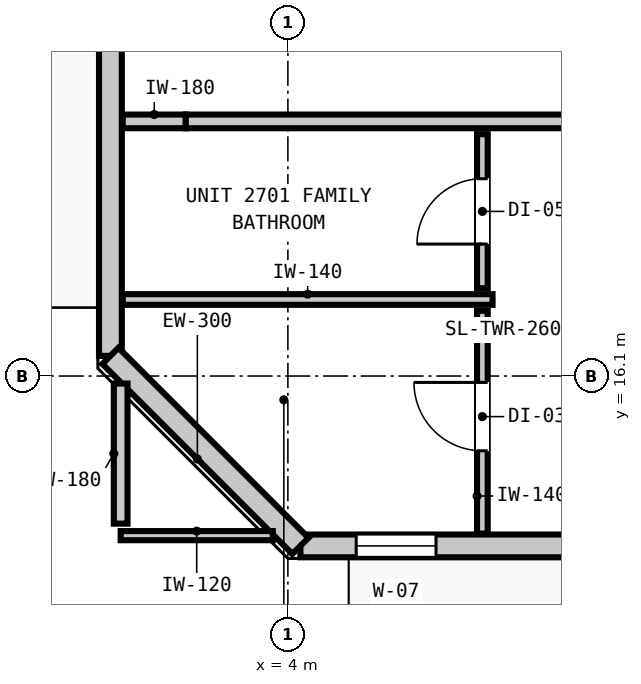
"""IFC4 building model, lengths in metres.
Left out: names, types, materials, properties, quantities, classifications, styles, units other than length and angle.
Written with IfcOpenShell. Run it as: python <this file> out.ifc"""

import sys

from ifc_helpers import new_model, si_unit, direction, frame, frame_2d, origin, place, context, subcontext, project, spatial, rectangle, extrude, element, fill, save


model = new_model("IFC4")
c1 = context("Model", 3, precision=1e-05, world=origin(), true_north=direction((0.0, 1.0)))
c2 = subcontext(c1, "Body", "Model", "MODEL_VIEW")
j1 = project(units=[si_unit("LENGTHUNIT", "METRE"), si_unit("PLANEANGLEUNIT", "RADIAN")], contexts=[c1])
p1 = place(None, origin())
s1 = spatial("IfcSite", under=j1, at=p1, CompositionType="ELEMENT")
p2 = place(p1, origin())
s2 = spatial("IfcBuilding", under=s1, at=p2, CompositionType="ELEMENT")
p3 = place(p2, frame((0.0, 0.0, 96.12)))
s3 = spatial("IfcBuildingStorey", under=s2, at=p3, CompositionType="ELEMENT", Elevation=96.12)
p4 = place(p3, frame((1.665, 16.365, 0.0), z_axis=(0.0, 0.0, 1.0), x_axis=(0.0, 1.0, 0.0)))
e1 = element("IfcWall", 1, at=p4, inside=s3, PredefinedType="STANDARD", context=c2, shape_type="SweptSolid", body=[
    extrude(rectangle(XDim=34.67, YDim=0.3, at=frame_2d((17.335, 0.0))), origin(), (0.0, 0.0, 1.0), 3.06),
])
p5 = place(p4, frame((6.854, 0.0, 0.0)))
e2 = element("IfcOpeningElement", 2, at=p5, cuts=e1, PredefinedType="OPENING", context=c2, shape_type="SweptSolid", body=[
    extrude(rectangle(XDim=1.0, YDim=2.15, at=frame_2d((0.5, 1.075))), frame((0.0, 0.16, 0.0), z_axis=(0.0, -1.0, 0.0), x_axis=(1.0, 0.0, 0.0)), (0.0, 0.0, 1.0), 0.32),
])
p6 = place(p4, frame((32.839, 0.0, 0.85)))
e3 = element("IfcOpeningElement", 3, at=p6, cuts=e1, PredefinedType="OPENING", context=c2, shape_type="SweptSolid", body=[
    extrude(rectangle(XDim=1.05, YDim=1.65, at=frame_2d((0.525, 0.825))), frame((0.0, 0.16, 0.0), z_axis=(0.0, -1.0, 0.0), x_axis=(1.0, 0.0, 0.0)), (0.0, 0.0, 1.0), 0.32),
])
p7 = place(p4, frame((10.044, 0.0, 0.85)))
e4 = element("IfcOpeningElement", 4, at=p7, cuts=e1, PredefinedType="OPENING", context=c2, shape_type="SweptSolid", body=[
    extrude(rectangle(XDim=2.4, YDim=1.95, at=frame_2d((1.2, 0.975))), frame((0.0, 0.16, 0.0), z_axis=(0.0, -1.0, 0.0), x_axis=(1.0, 0.0, 0.0)), (0.0, 0.0, 1.0), 0.32),
])
p8 = place(p4, frame((19.145, 0.0, 0.85)))
e5 = element("IfcOpeningElement", 5, at=p8, cuts=e1, PredefinedType="OPENING", context=c2, shape_type="SweptSolid", body=[
    extrude(rectangle(XDim=2.4, YDim=1.95, at=frame_2d((1.2, 0.975))), frame((0.0, 0.16, 0.0), z_axis=(0.0, -1.0, 0.0), x_axis=(1.0, 0.0, 0.0)), (0.0, 0.0, 1.0), 0.32),
])
p9 = place(p3, frame((41.635, 13.865, 0.0), z_axis=(0.0, 0.0, 1.0), x_axis=(-1.0, 0.0, 0.0)))
e6 = element("IfcWall", 6, at=p9, inside=s3, PredefinedType="STANDARD", context=c2, shape_type="SweptSolid", body=[
    extrude(rectangle(XDim=37.47, YDim=0.3, at=frame_2d((18.735, 0.0))), origin(), (0.0, 0.0, 1.0), 3.06),
])
p10 = place(p9, frame((0.901, 0.0, 0.0)))
e7 = element("IfcOpeningElement", 7, at=p10, cuts=e6, PredefinedType="OPENING", context=c2, shape_type="SweptSolid", body=[
    extrude(rectangle(XDim=1.0, YDim=2.15, at=frame_2d((0.5, 1.075))), frame((0.0, 0.16, 0.0), z_axis=(0.0, -1.0, 0.0), x_axis=(1.0, 0.0, 0.0)), (0.0, 0.0, 1.0), 0.32),
])
p11 = place(p9, frame((31.179, 0.0, 0.85)))
e8 = element("IfcOpeningElement", 8, at=p11, cuts=e6, PredefinedType="OPENING", context=c2, shape_type="SweptSolid", body=[
    extrude(rectangle(XDim=2.4, YDim=1.95, at=frame_2d((1.2, 0.975))), frame((0.0, 0.16, 0.0), z_axis=(0.0, -1.0, 0.0), x_axis=(1.0, 0.0, 0.0)), (0.0, 0.0, 1.0), 0.32),
])
p12 = place(p9, frame((35.686, 0.0, 0.85)))
e9 = element("IfcOpeningElement", 9, at=p12, cuts=e6, PredefinedType="OPENING", context=c2, shape_type="SweptSolid", body=[
    extrude(rectangle(XDim=1.05, YDim=1.65, at=frame_2d((0.525, 0.825))), frame((0.0, 0.16, 0.0), z_axis=(0.0, -1.0, 0.0), x_axis=(1.0, 0.0, 0.0)), (0.0, 0.0, 1.0), 0.32),
])
p13 = place(p9, frame((24.374, 0.0, 0.85)))
e10 = element("IfcOpeningElement", 10, at=p13, cuts=e6, PredefinedType="OPENING", context=c2, shape_type="SweptSolid", body=[
    extrude(rectangle(XDim=2.4, YDim=1.95, at=frame_2d((1.2, 0.975))), frame((0.0, 0.16, 0.0), z_axis=(0.0, -1.0, 0.0), x_axis=(1.0, 0.0, 0.0)), (0.0, 0.0, 1.0), 0.32),
])
p14 = place(p9, frame((21.95, 0.0, 0.85)))
e11 = element("IfcOpeningElement", 11, at=p14, cuts=e6, PredefinedType="OPENING", context=c2, shape_type="SweptSolid", body=[
    extrude(rectangle(XDim=1.05, YDim=1.65, at=frame_2d((0.525, 0.825))), frame((0.0, 0.16, 0.0), z_axis=(0.0, -1.0, 0.0), x_axis=(1.0, 0.0, 0.0)), (0.0, 0.0, 1.0), 0.32),
])
p15 = place(p9, frame((7.095, 0.0, 0.85)))
e12 = element("IfcOpeningElement", 12, at=p15, cuts=e6, PredefinedType="OPENING", context=c2, shape_type="SweptSolid", body=[
    extrude(rectangle(XDim=2.4, YDim=1.95, at=frame_2d((1.2, 0.975))), frame((0.0, 0.16, 0.0), z_axis=(0.0, -1.0, 0.0), x_axis=(1.0, 0.0, 0.0)), (0.0, 0.0, 1.0), 0.32),
])
p16 = place(p9, frame((14.599, 0.0, 0.85)))
e13 = element("IfcOpeningElement", 13, at=p16, cuts=e6, PredefinedType="OPENING", context=c2, shape_type="SweptSolid", body=[
    extrude(rectangle(XDim=2.4, YDim=1.95, at=frame_2d((1.2, 0.975))), frame((0.0, 0.16, 0.0), z_axis=(0.0, -1.0, 0.0), x_axis=(1.0, 0.0, 0.0)), (0.0, 0.0, 1.0), 0.32),
])
p17 = place(p9, frame((2.328, 0.0, 0.85)))
e14 = element("IfcOpeningElement", 14, at=p17, cuts=e6, PredefinedType="OPENING", context=c2, shape_type="SweptSolid", body=[
    extrude(rectangle(XDim=0.9, YDim=1.5, at=frame_2d((0.45, 0.75))), frame((0.0, 0.16, 0.0), z_axis=(0.0, -1.0, 0.0), x_axis=(1.0, 0.0, 0.0)), (0.0, 0.0, 1.0), 0.32),
])
p18 = place(p3, frame((4.165, 13.865, 0.0), z_axis=(0.0, 0.0, 1.0), x_axis=(-0.707106781187, 0.707106781187, 0.0)))
e15 = element("IfcWall", 15, at=p18, inside=s3, PredefinedType="STANDARD", context=c2, shape_type="SweptSolid", body=[
    extrude(rectangle(XDim=3.536, YDim=0.3, at=frame_2d((1.768, 0.0))), origin(), (0.0, 0.0, 1.0), 3.06),
])
p19 = place(p3, frame((1.827, 19.45, 0.0), z_axis=(0.0, 0.0, 1.0), x_axis=(1.0, 0.0, 0.0)))
e16 = element("IfcWall", 16, at=p19, inside=s3, PredefinedType="PARTITIONING", context=c2, shape_type="SweptSolid", body=[
    extrude(rectangle(XDim=0.83, YDim=0.18, at=frame_2d((0.415, 0.0))), origin(), (0.0, 0.0, 1.0), 3.06),
])
p20 = place(p3, frame((2.657, 19.45, 0.0), z_axis=(0.0, 0.0, 1.0), x_axis=(1.0, 0.0, 0.0)))
e17 = element("IfcWall", 17, at=p20, inside=s3, PredefinedType="PARTITIONING", context=c2, shape_type="SweptSolid", body=[
    extrude(rectangle(XDim=10.336, YDim=0.18, at=frame_2d((5.168, 0.0))), origin(), (0.0, 0.0, 1.0), 2.445),
])
p21 = place(p20, frame((6.099, 0.0, 0.0)))
e18 = element("IfcOpeningElement", 18, at=p21, cuts=e17, PredefinedType="OPENING", context=c2, shape_type="SweptSolid", body=[
    extrude(rectangle(XDim=1.0, YDim=2.15, at=frame_2d((0.5, 1.075))), frame((0.0, 0.1, 0.0), z_axis=(0.0, -1.0, 0.0), x_axis=(1.0, 0.0, 0.0)), (0.0, 0.0, 1.0), 0.2),
])
p22 = place(p3, frame((1.827, 17.107, 0.0), z_axis=(0.0, 0.0, 1.0), x_axis=(1.0, 0.0, 0.0)))
e19 = element("IfcWall", 19, at=p22, inside=s3, PredefinedType="PARTITIONING", context=c2, shape_type="SweptSolid", body=[
    extrude(rectangle(XDim=4.866, YDim=0.14, at=frame_2d((2.433, 0.0))), origin(), (0.0, 0.0, 1.0), 3.06),
])
p23 = place(p3, frame((1.8, 14.0, 0.0), z_axis=(0.0, 0.0, 1.0), x_axis=(1.0, 0.0, 0.0)))
e20 = element("IfcWall", 20, at=p23, inside=s3, PredefinedType="PARTITIONING", context=c2, shape_type="SweptSolid", body=[
    extrude(rectangle(XDim=2.001, YDim=0.12, at=frame_2d((1.0, 0.0))), origin(), (0.0, 0.0, 1.0), 3.06),
])
p24 = place(p3, frame((1.8, 14.158, 0.0), z_axis=(0.0, 0.0, 1.0), x_axis=(0.0, 1.0, 0.0)))
e21 = element("IfcWall", 21, at=p24, inside=s3, PredefinedType="PARTITIONING", context=c2, shape_type="SweptSolid", body=[
    extrude(rectangle(XDim=1.843, YDim=0.18, at=frame_2d((0.921, 0.0))), origin(), (0.0, 0.0, 1.0), 3.06),
])
p25 = place(p3, frame((6.559, 14.027, 0.0), z_axis=(0.0, 0.0, 1.0), x_axis=(0.0, 1.0, 0.0)))
e22 = element("IfcWall", 22, at=p25, inside=s3, PredefinedType="PARTITIONING", context=c2, shape_type="SweptSolid", body=[
    extrude(rectangle(XDim=2.932, YDim=0.14, at=frame_2d((1.466, 0.0))), origin(), (0.0, 0.0, 1.0), 3.06),
])
p26 = place(p25, frame((1.089, 0.0, 0.0)))
e23 = element("IfcOpeningElement", 23, at=p26, cuts=e22, PredefinedType="OPENING", context=c2, shape_type="SweptSolid", body=[
    extrude(rectangle(XDim=0.9, YDim=2.1, at=frame_2d((0.45, 1.05))), frame((0.0, 0.08, 0.0), z_axis=(0.0, -1.0, 0.0), x_axis=(1.0, 0.0, 0.0)), (0.0, 0.0, 1.0), 0.16),
])
p27 = place(p3, frame((6.559, 17.255, 0.0), z_axis=(0.0, 0.0, 1.0), x_axis=(0.0, 1.0, 0.0)))
e24 = element("IfcWall", 24, at=p27, inside=s3, PredefinedType="PARTITIONING", context=c2, shape_type="SweptSolid", body=[
    extrude(rectangle(XDim=2.027, YDim=0.14, at=frame_2d((1.014, 0.0))), origin(), (0.0, 0.0, 1.0), 3.06),
])
p28 = place(p27, frame((0.581, 0.0, 0.0)))
e25 = element("IfcOpeningElement", 25, at=p28, cuts=e24, PredefinedType="OPENING", context=c2, shape_type="SweptSolid", body=[
    extrude(rectangle(XDim=0.86, YDim=2.02, at=frame_2d((0.43, 1.01))), frame((0.0, 0.08, 0.0), z_axis=(0.0, -1.0, 0.0), x_axis=(1.0, 0.0, 0.0)), (0.0, 0.0, 1.0), 0.16),
])
p29 = place(p12, origin())
e26 = element("IfcWindow", 26, at=p29, inside=s3, PartitioningType="SINGLE_PANEL", PredefinedType="WINDOW", context=c2, shape_type="SweptSolid", body=[
    extrude(rectangle(XDim=1.05, YDim=1.65, at=frame_2d((0.525, 0.825))), frame((0.0, 0.03, 0.0), z_axis=(0.0, -1.0, 0.0), x_axis=(1.0, 0.0, 0.0)), (0.0, 0.0, 1.0), 0.06),
])
fill(e9, e26)
p30 = place(p28, origin())
e27 = element("IfcDoor", 27, at=p30, inside=s3, OperationType="SINGLE_SWING_LEFT", PredefinedType="DOOR", context=c2, shape_type="SweptSolid", body=[
    extrude(rectangle(XDim=0.86, YDim=2.02, at=frame_2d((0.43, 1.01))), frame((0.0, 0.025, 0.0), z_axis=(0.0, -1.0, 0.0), x_axis=(1.0, 0.0, 0.0)), (0.0, 0.0, 1.0), 0.05),
])
fill(e25, e27)
p31 = place(p26, origin())
e28 = element("IfcDoor", 28, at=p31, inside=s3, OperationType="SINGLE_SWING_RIGHT", PredefinedType="DOOR", context=c2, shape_type="SweptSolid", body=[
    extrude(rectangle(XDim=0.9, YDim=2.1, at=frame_2d((0.45, 1.05))), frame((0.0, 0.025, 0.0), z_axis=(0.0, -1.0, 0.0), x_axis=(1.0, 0.0, 0.0)), (0.0, 0.0, 1.0), 0.05),
])
fill(e23, e28)
save(model, sys.argv[1])
